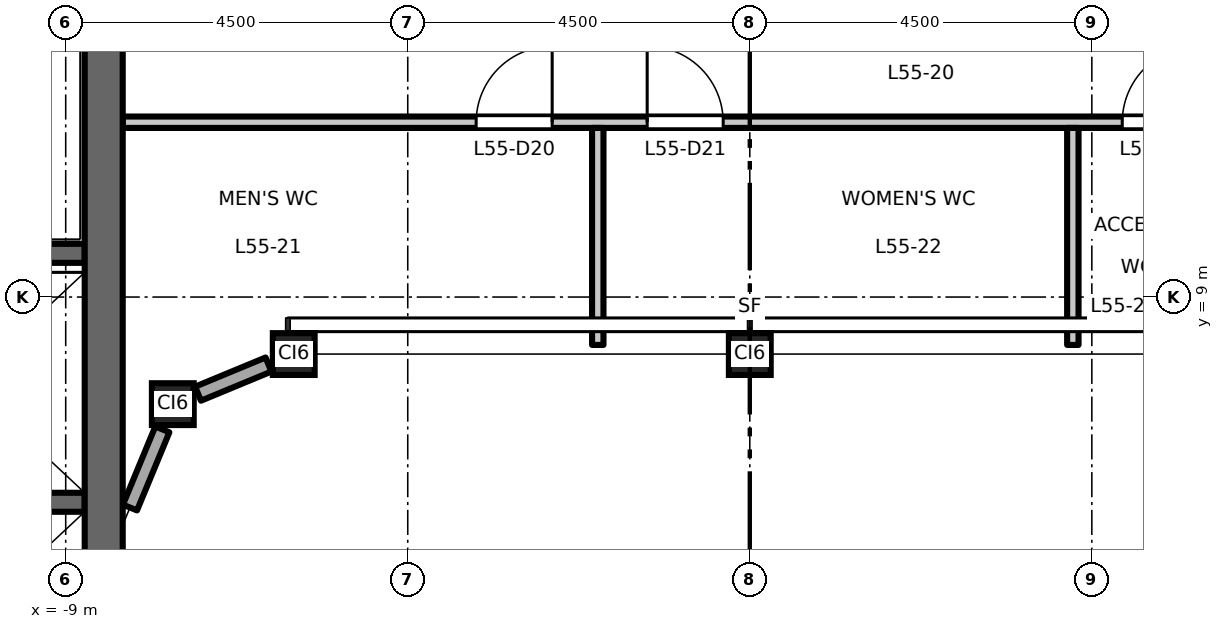
"""IFC4 building model, lengths in metres.
Left out: names, types, materials, properties, quantities, classifications, styles, units other than length and angle.
Written with IfcOpenShell. Run it as: python <this file> out.ifc"""

import sys

from ifc_helpers import new_model, si_unit, direction, frame, frame_2d, origin, origin_2d, place, context, subcontext, project, spatial, rectangle, hollow_rectangle, extrude, element, fill, save


model = new_model("IFC4")
c1 = context("Model", 3, precision=1e-05, world=origin(), true_north=direction((0.0, 1.0)))
c2 = subcontext(c1, "Body", "Model", "MODEL_VIEW")
j1 = project(units=[si_unit("LENGTHUNIT", "METRE"), si_unit("PLANEANGLEUNIT", "RADIAN")], contexts=[c1])
p1 = place(None, origin())
s1 = spatial("IfcSite", under=j1, at=p1, CompositionType="ELEMENT")
p2 = place(p1, origin())
s2 = spatial("IfcBuilding", under=s1, at=p2, CompositionType="ELEMENT")
p3 = place(p2, frame((0.0, 0.0, 255.7)))
s3 = spatial("IfcBuildingStorey", under=s2, at=p3, CompositionType="ELEMENT", Elevation=255.7)
for number, where, z_axis, x_axis in (
    (1, (-7.591, 7.591, 0.0), (0.0, 0.0, 1.0), (1.0, 0.0, 0.0)),
    (2, (-6.0, 8.25, 0.0), (0.0, 0.0, 1.0), (1.0, 0.0, 0.0)),
    (3, (0.0, 8.25, 0.0), (0.0, 0.0, 1.0), (1.0, 0.0, 0.0)),
):
    element("IfcColumn", number, at=place(p3, frame(where, z_axis=z_axis, x_axis=x_axis)), inside=s3, PredefinedType="COLUMN", context=c2, shape_type="SweptSolid", body=[
        extrude(hollow_rectangle(XDim=0.55, YDim=0.55, WallThickness=0.028, at=origin_2d()), origin(), (0.0, 0.0, 1.0), 4.5),
    ])
p4 = place(p3, frame((-8.75, 6.3, 0.0), z_axis=(0.0, 0.0, 1.0), x_axis=(-1.0, 0.0, 0.0)))
e4 = element("IfcWall", 4, at=p4, inside=s3, PredefinedType="SHEAR", context=c2, shape_type="SweptSolid", body=[
    extrude(rectangle(XDim=3.1, YDim=0.25, at=frame_2d((1.55, 0.0))), origin(), (0.0, 0.0, 1.0), 4.35),
])
p5 = place(p3, frame((-8.75, 9.575, 0.0), z_axis=(0.0, 0.0, 1.0), x_axis=(-1.0, 0.0, 0.0)))
e5 = element("IfcWall", 5, at=p5, inside=s3, PredefinedType="SHEAR", context=c2, shape_type="SweptSolid", body=[
    extrude(rectangle(XDim=8.0, YDim=0.25, at=frame_2d((4.0, 0.0))), origin(), (0.0, 0.0, 1.0), 4.35),
])
p6 = place(p5, frame((6.65, 0.0, 0.0)))
e6 = element("IfcOpeningElement", 6, at=p6, cuts=e5, PredefinedType="OPENING", context=c2, shape_type="SweptSolid", body=[
    extrude(rectangle(XDim=1.1, YDim=2.1, at=frame_2d((0.55, 1.05))), frame((0.0, 0.135, 0.0), z_axis=(0.0, -1.0, 0.0), x_axis=(1.0, 0.0, 0.0)), (0.0, 0.0, 1.0), 0.27),
])
p7 = place(p3, frame((-8.5, -13.0, 0.0), z_axis=(0.0, 0.0, 1.0), x_axis=(0.0, 1.0, 0.0)))
e7 = element("IfcWall", 7, at=p7, inside=s3, PredefinedType="SHEAR", context=c2, shape_type="SweptSolid", body=[
    extrude(rectangle(XDim=26.0, YDim=0.5, at=frame_2d((13.0, 0.0))), origin(), (0.0, 0.0, 1.0), 4.35),
])
p8 = place(p3, frame((-6.332, 8.113, 0.0), z_axis=(0.0, 0.0, 1.0), x_axis=(-0.923859650767, -0.382731427616, 0.0)))
e8 = element("IfcWall", 8, at=p8, inside=s3, PredefinedType="STANDARD", context=c2, shape_type="SweptSolid", body=[
    extrude(rectangle(XDim=1.003, YDim=0.2, at=frame_2d((0.502, 0.0))), origin(), (0.0, 0.0, 1.0), 3.918),
])
p9 = place(p3, frame((-7.729, 7.259, 0.0), z_axis=(0.0, 0.0, 1.0), x_axis=(-0.382635994082, -0.923899180665, 0.0)))
e9 = element("IfcWall", 9, at=p9, inside=s3, PredefinedType="STANDARD", context=c2, shape_type="SweptSolid", body=[
    extrude(rectangle(XDim=1.113, YDim=0.2, at=frame_2d((0.556, 0.0))), origin(), (0.0, 0.0, 1.0), 3.918),
])
p10 = place(p3, frame((-8.25, 11.3, 0.0), z_axis=(0.0, 0.0, 1.0), x_axis=(1.0, 0.0, 0.0)))
e10 = element("IfcWall", 10, at=p10, inside=s3, PredefinedType="PARTITIONING", context=c2, shape_type="SweptSolid", body=[
    extrude(rectangle(XDim=15.05, YDim=0.15, at=frame_2d((7.525, 0.0))), origin(), (0.0, 0.0, 1.0), 4.35),
])
p11 = place(p10, frame((4.65, 0.0, 0.0)))
e11 = element("IfcOpeningElement", 11, at=p11, cuts=e10, PredefinedType="OPENING", context=c2, shape_type="SweptSolid", body=[
    extrude(rectangle(XDim=1.0, YDim=2.1, at=frame_2d((0.5, 1.05))), frame((0.0, 0.085, 0.0), z_axis=(0.0, -1.0, 0.0), x_axis=(1.0, 0.0, 0.0)), (0.0, 0.0, 1.0), 0.17),
])
p12 = place(p10, frame((6.9, 0.0, 0.0)))
e12 = element("IfcOpeningElement", 12, at=p12, cuts=e10, PredefinedType="OPENING", context=c2, shape_type="SweptSolid", body=[
    extrude(rectangle(XDim=1.0, YDim=2.1, at=frame_2d((0.5, 1.05))), frame((0.0, 0.085, 0.0), z_axis=(0.0, -1.0, 0.0), x_axis=(1.0, 0.0, 0.0)), (0.0, 0.0, 1.0), 0.17),
])
p13 = place(p10, frame((13.15, 0.0, 0.0)))
e13 = element("IfcOpeningElement", 13, at=p13, cuts=e10, PredefinedType="OPENING", context=c2, shape_type="SweptSolid", body=[
    extrude(rectangle(XDim=1.0, YDim=2.1, at=frame_2d((0.5, 1.05))), frame((0.0, 0.085, 0.0), z_axis=(0.0, -1.0, 0.0), x_axis=(1.0, 0.0, 0.0)), (0.0, 0.0, 1.0), 0.17),
])
for number, where, z_axis, x_axis in (
    (14, (-2.0, 8.37, 0.0), (0.0, 0.0, 1.0), (0.0, 1.0, 0.0)),
    (15, (4.25, 8.37, 0.0), (0.0, 0.0, 1.0), (0.0, 1.0, 0.0)),
):
    element("IfcWall", number, at=place(p3, frame(where, z_axis=z_axis, x_axis=x_axis)), inside=s3, PredefinedType="PARTITIONING", context=c2, shape_type="SweptSolid", body=[
        extrude(rectangle(XDim=2.855, YDim=0.15, at=frame_2d((1.427, 0.0))), origin(), (0.0, 0.0, 1.0), 4.35),
    ])
p14 = place(p11, origin())
e16 = element("IfcDoor", 16, at=p14, inside=s3, OperationType="SINGLE_SWING_RIGHT", PredefinedType="DOOR", context=c2, shape_type="SweptSolid", body=[
    extrude(rectangle(XDim=1.0, YDim=2.1, at=frame_2d((0.5, 1.05))), frame((0.0, 0.025, 0.0), z_axis=(0.0, -1.0, 0.0), x_axis=(1.0, 0.0, 0.0)), (0.0, 0.0, 1.0), 0.05),
])
fill(e11, e16)
p15 = place(p12, origin())
e17 = element("IfcDoor", 17, at=p15, inside=s3, OperationType="SINGLE_SWING_LEFT", PredefinedType="DOOR", context=c2, shape_type="SweptSolid", body=[
    extrude(rectangle(XDim=1.0, YDim=2.1, at=frame_2d((0.5, 1.05))), frame((0.0, 0.025, 0.0), z_axis=(0.0, -1.0, 0.0), x_axis=(1.0, 0.0, 0.0)), (0.0, 0.0, 1.0), 0.05),
])
fill(e12, e17)
p16 = place(p13, origin())
e18 = element("IfcDoor", 18, at=p16, inside=s3, OperationType="SINGLE_SWING_RIGHT", PredefinedType="DOOR", context=c2, shape_type="SweptSolid", body=[
    extrude(rectangle(XDim=1.0, YDim=2.1, at=frame_2d((0.5, 1.05))), frame((0.0, 0.025, 0.0), z_axis=(0.0, -1.0, 0.0), x_axis=(1.0, 0.0, 0.0)), (0.0, 0.0, 1.0), 0.05),
])
fill(e13, e18)
save(model, sys.argv[1])
